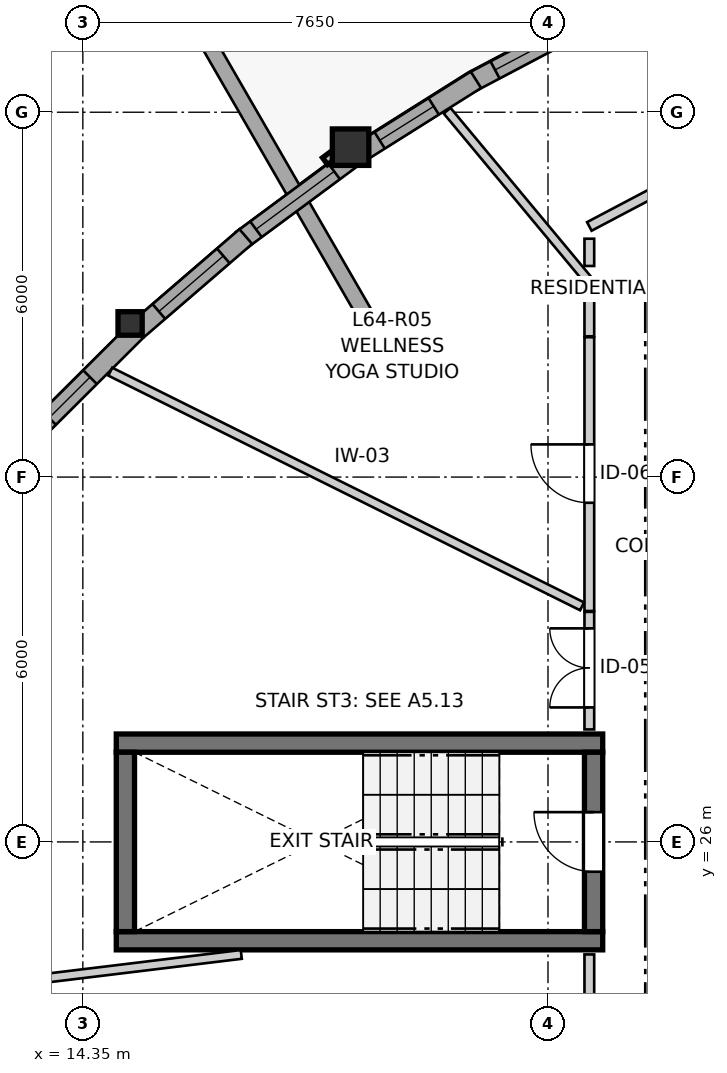
"""IFC4 building model, lengths in metres.
Left out: names, types, materials, properties, quantities, classifications, styles, units other than length and angle.
Written with IfcOpenShell. Run it as: python <this file> out.ifc"""

import sys

from ifc_helpers import new_model, si_unit, direction, frame, frame_2d, origin, origin_2d, place, context, subcontext, project, spatial, rectangle, i_section, extrude, source, transform, mapped, element, fill, save


model = new_model("IFC4")
c1 = context("Model", 3, precision=1e-05, world=origin(), true_north=direction((0.0, 1.0)))
c2 = subcontext(c1, "Body", "Model", "MODEL_VIEW")
j1 = project(units=[si_unit("LENGTHUNIT", "METRE"), si_unit("PLANEANGLEUNIT", "RADIAN")], contexts=[c1])
p1 = place(None, origin())
s1 = spatial("IfcSite", under=j1, at=p1, CompositionType="ELEMENT")
p2 = place(p1, origin())
s2 = spatial("IfcBuilding", under=s1, at=p2, CompositionType="ELEMENT")
p3 = place(p2, frame((0.0, 0.0, 214.8)))
s3 = spatial("IfcBuildingStorey", under=s2, at=p3, CompositionType="ELEMENT", Elevation=214.8)
for number, where, z_axis, x_axis in (
    (1, (14.9, 24.375, 0.0), (0.0, 0.0, 1.0), (1.0, 0.0, 0.0)),
    (2, (22.9, 27.625, 0.0), (0.0, 0.0, 1.0), (-1.0, 0.0, 0.0)),
):
    element("IfcWall", number, at=place(p3, frame(where, z_axis=z_axis, x_axis=x_axis)), inside=s3, PredefinedType="SHEAR", context=c2, shape_type="SweptSolid", body=[
        extrude(rectangle(XDim=8.0, YDim=0.3, at=frame_2d((4.0, 0.0))), origin(), (0.0, 0.0, 1.0), 2.96),
    ])
p4 = place(p3, frame((15.05, 27.475, 0.0), z_axis=(0.0, 0.0, 1.0), x_axis=(0.0, -1.0, 0.0)))
e3 = element("IfcWall", 3, at=p4, inside=s3, PredefinedType="SHEAR", context=c2, shape_type="SweptSolid", body=[
    extrude(rectangle(XDim=2.95, YDim=0.3, at=frame_2d((1.475, 0.0))), origin(), (0.0, 0.0, 1.0), 2.96),
])
p5 = place(p3, frame((22.75, 24.525, 0.0), z_axis=(0.0, 0.0, 1.0), x_axis=(0.0, 1.0, 0.0)))
e4 = element("IfcWall", 4, at=p5, inside=s3, PredefinedType="SHEAR", context=c2, shape_type="SweptSolid", body=[
    extrude(rectangle(XDim=2.95, YDim=0.3, at=frame_2d((1.475, 0.0))), origin(), (0.0, 0.0, 1.0), 2.96),
])
p6 = place(p5, frame((0.985, 0.0, 0.0)))
e5 = element("IfcOpeningElement", 5, at=p6, cuts=e4, PredefinedType="OPENING", context=c2, shape_type="SweptSolid", body=[
    extrude(rectangle(XDim=0.98, YDim=2.15, at=frame_2d((0.49, 1.075))), frame((0.0, 0.16, 0.0), z_axis=(0.0, -1.0, 0.0), x_axis=(1.0, 0.0, 0.0)), (0.0, 0.0, 1.0), 0.32),
])
m1 = source(origin(), c2, "Body", "SweptSolid", [
    extrude(rectangle(XDim=0.6, YDim=0.6, at=origin_2d()), origin(), (0.0, 0.0, 1.0), 2.96),
])
p7 = place(p3, frame((18.753, 37.426, 0.0), z_axis=(0.0, 0.0, 1.0), x_axis=(1.0, 0.0, 0.0)))
e6 = element("IfcColumn", 6, at=p7, inside=s3, PredefinedType="COLUMN", context=c2, shape_type="MappedRepresentation", body=[
    mapped(m1, transform((0.0, 0.0, 0.0), x_axis=(1.0, 0.0, 0.0), y_axis=(0.0, 1.0, 0.0), z_axis=(0.0, 0.0, 1.0), scale=1.0)),
])
m2 = source(origin(), c2, "Body", "SweptSolid", [
    extrude(i_section(OverallWidth=0.398, OverallDepth=0.387, WebThickness=0.019, FlangeThickness=0.03, FilletRadius=0.015, at=origin_2d()), origin(), (0.0, 0.0, 1.0), 2.96),
])
p8 = place(p3, frame((15.127, 34.526, 0.0), z_axis=(0.0, 0.0, 1.0), x_axis=(1.0, 0.0, 0.0)))
e7 = element("IfcColumn", 7, at=p8, inside=s3, PredefinedType="PILASTER", context=c2, shape_type="MappedRepresentation", body=[
    mapped(m2, transform((0.0, 0.0, 0.0), x_axis=(1.0, 0.0, 0.0), y_axis=(0.0, 1.0, 0.0), z_axis=(0.0, 0.0, 1.0), scale=1.0)),
])
p9 = place(p3, frame((8.912, 52.131, 0.0), z_axis=(0.0, 0.0, 1.0), x_axis=(0.500001129448, -0.866024751696, 0.0)))
e8 = element("IfcWall", 8, at=p9, inside=s3, PredefinedType="PARAPET", context=c2, shape_type="SweptSolid", body=[
    extrude(rectangle(XDim=20.349, YDim=0.26, at=frame_2d((10.175, 0.0))), origin(), (0.0, 0.0, 1.0), 0.55),
])
p10 = place(p3, frame((22.785, 39.57, 0.0), z_axis=(0.0, 0.0, 1.0), x_axis=(-0.884379914657, -0.466767786541, 0.0)))
e9 = element("IfcWall", 9, at=p10, inside=s3, PredefinedType="SOLIDWALL", context=c2, shape_type="SweptSolid", body=[
    extrude(rectangle(XDim=2.314, YDim=0.32, at=frame_2d((1.157, 0.0))), origin(), (0.0, 0.0, 1.0), 2.58),
])
p11 = place(p10, frame((0.422, 0.0, 0.82)))
e10 = element("IfcOpeningElement", 10, at=p11, cuts=e9, PredefinedType="OPENING", context=c2, shape_type="SweptSolid", body=[
    extrude(rectangle(XDim=1.45, YDim=1.25, at=frame_2d((0.725, 0.625))), frame((0.0, 0.17, 0.0), z_axis=(0.0, -1.0, 0.0), x_axis=(1.0, 0.0, 0.0)), (0.0, 0.0, 1.0), 0.34),
])
p12 = place(p3, frame((20.815, 38.533, 0.0), z_axis=(0.0, 0.0, 1.0), x_axis=(-0.846418054627, -0.532518991963, 0.0)))
e11 = element("IfcWall", 11, at=p12, inside=s3, PredefinedType="SOLIDWALL", context=c2, shape_type="SweptSolid", body=[
    extrude(rectangle(XDim=2.245, YDim=0.32, at=frame_2d((1.122, 0.0))), origin(), (0.0, 0.0, 1.0), 2.58),
])
p13 = place(p12, frame((0.82, 0.0, 0.82)))
e12 = element("IfcOpeningElement", 12, at=p13, cuts=e11, PredefinedType="OPENING", context=c2, shape_type="SweptSolid", body=[
    extrude(rectangle(XDim=1.05, YDim=1.45, at=frame_2d((0.525, 0.725))), frame((0.0, 0.17, 0.0), z_axis=(0.0, -1.0, 0.0), x_axis=(1.0, 0.0, 0.0)), (0.0, 0.0, 1.0), 0.34),
])
p14 = place(p3, frame((18.776, 37.243, 0.0), z_axis=(0.0, 0.0, 1.0), x_axis=(-0.803798468353, -0.594901691267, 0.0)))
e13 = element("IfcWall", 13, at=p14, inside=s3, PredefinedType="SOLIDWALL", context=c2, shape_type="SweptSolid", body=[
    extrude(rectangle(XDim=2.258, YDim=0.32, at=frame_2d((1.129, 0.0))), origin(), (0.0, 0.0, 1.0), 2.58),
])
p15 = place(p14, frame((0.364, 0.0, 0.82)))
e14 = element("IfcOpeningElement", 14, at=p15, cuts=e13, PredefinedType="OPENING", context=c2, shape_type="SweptSolid", body=[
    extrude(rectangle(XDim=1.6, YDim=1.35, at=frame_2d((0.8, 0.675))), frame((0.0, 0.17, 0.0), z_axis=(0.0, -1.0, 0.0), x_axis=(1.0, 0.0, 0.0)), (0.0, 0.0, 1.0), 0.34),
])
p16 = place(p3, frame((17.03, 35.955, 0.0), z_axis=(0.0, 0.0, 1.0), x_axis=(-0.757489541562, -0.652847297937, 0.0)))
e15 = element("IfcWall", 15, at=p16, inside=s3, PredefinedType="SOLIDWALL", context=c2, shape_type="SweptSolid", body=[
    extrude(rectangle(XDim=2.354, YDim=0.32, at=frame_2d((1.177, 0.0))), origin(), (0.0, 0.0, 1.0), 2.58),
])
p17 = place(p16, frame((0.487, 0.0, 0.82)))
e16 = element("IfcOpeningElement", 16, at=p17, cuts=e15, PredefinedType="OPENING", context=c2, shape_type="SweptSolid", body=[
    extrude(rectangle(XDim=1.4, YDim=1.35, at=frame_2d((0.7, 0.675))), frame((0.0, 0.17, 0.0), z_axis=(0.0, -1.0, 0.0), x_axis=(1.0, 0.0, 0.0)), (0.0, 0.0, 1.0), 0.34),
])
p18 = place(p3, frame((15.226, 34.399, 0.0), z_axis=(0.0, 0.0, 1.0), x_axis=(-0.708431997636, -0.705779076429, 0.0)))
e17 = element("IfcWall", 17, at=p18, inside=s3, PredefinedType="SOLIDWALL", context=c2, shape_type="SweptSolid", body=[
    extrude(rectangle(XDim=2.393, YDim=0.32, at=frame_2d((1.196, 0.0))), origin(), (0.0, 0.0, 1.0), 2.58),
])
p19 = place(p18, frame((1.07, 0.0, 0.82)))
e18 = element("IfcOpeningElement", 18, at=p19, cuts=e17, PredefinedType="OPENING", context=c2, shape_type="SweptSolid", body=[
    extrude(rectangle(XDim=0.95, YDim=1.35, at=frame_2d((0.475, 0.675))), frame((0.0, 0.17, 0.0), z_axis=(0.0, -1.0, 0.0), x_axis=(1.0, 0.0, 0.0)), (0.0, 0.0, 1.0), 0.34),
])
p20 = place(p3, frame((22.68, 29.798, 0.0), z_axis=(0.0, 0.0, 1.0), x_axis=(0.0, 1.0, 0.0)))
e19 = element("IfcWall", 19, at=p20, inside=s3, PredefinedType="PARTITIONING", context=c2, shape_type="SweptSolid", body=[
    extrude(rectangle(XDim=4.502, YDim=0.16, at=frame_2d((2.251, 0.0))), origin(), (0.0, 0.0, 1.0), 2.96),
])
p21 = place(p20, frame((1.78, 0.0, 0.0)))
e20 = element("IfcOpeningElement", 20, at=p21, cuts=e19, PredefinedType="OPENING", context=c2, shape_type="SweptSolid", body=[
    extrude(rectangle(XDim=0.96, YDim=2.1, at=frame_2d((0.48, 1.05))), frame((0.0, 0.09, 0.0), z_axis=(0.0, -1.0, 0.0), x_axis=(1.0, 0.0, 0.0)), (0.0, 0.0, 1.0), 0.18),
])
p22 = place(p3, frame((22.68, 21.241, 0.0), z_axis=(0.0, 0.0, 1.0), x_axis=(0.0, 1.0, 0.0)))
e21 = element("IfcWall", 21, at=p22, inside=s3, PredefinedType="PARTITIONING", context=c2, shape_type="SweptSolid", body=[
    extrude(rectangle(XDim=2.909, YDim=0.16, at=frame_2d((1.455, 0.0))), origin(), (0.0, 0.0, 1.0), 2.96),
])
p23 = place(p22, frame((0.826, 0.0, 0.0)))
e22 = element("IfcOpeningElement", 22, at=p23, cuts=e21, PredefinedType="OPENING", context=c2, shape_type="SweptSolid", body=[
    extrude(rectangle(XDim=1.3, YDim=2.1, at=frame_2d((0.65, 1.05))), frame((0.0, 0.09, 0.0), z_axis=(0.0, -1.0, 0.0), x_axis=(1.0, 0.0, 0.0)), (0.0, 0.0, 1.0), 0.18),
])
p24 = place(p3, frame((22.68, 27.85, 0.0), z_axis=(0.0, 0.0, 1.0), x_axis=(0.0, 1.0, 0.0)))
e23 = element("IfcWall", 23, at=p24, inside=s3, PredefinedType="PARTITIONING", context=c2, shape_type="SweptSolid", body=[
    extrude(rectangle(XDim=1.933, YDim=0.16, at=frame_2d((0.966, 0.0))), origin(), (0.0, 0.0, 1.0), 2.96),
])
p25 = place(p24, frame((0.362, 0.0, 0.0)))
e24 = element("IfcOpeningElement", 24, at=p25, cuts=e23, PredefinedType="OPENING", context=c2, shape_type="SweptSolid", body=[
    extrude(rectangle(XDim=1.3, YDim=2.1, at=frame_2d((0.65, 1.05))), frame((0.0, 0.09, 0.0), z_axis=(0.0, -1.0, 0.0), x_axis=(1.0, 0.0, 0.0)), (0.0, 0.0, 1.0), 0.18),
])
p26 = place(p3, frame((14.802, 33.734, 0.0), z_axis=(0.0, 0.0, 1.0), x_axis=(0.895354955696, -0.445353234311, 0.0)))
e25 = element("IfcWall", 25, at=p26, inside=s3, PredefinedType="PARTITIONING", context=c2, shape_type="SweptSolid", body=[
    extrude(rectangle(XDim=8.666, YDim=0.145, at=frame_2d((4.333, 0.0))), origin(), (0.0, 0.0, 1.0), 2.96),
])
p27 = place(p3, frame((10.087, 23.315, 0.0), z_axis=(0.0, 0.0, 1.0), x_axis=(0.992692853732, 0.120668546642, 0.0)))
e26 = element("IfcWall", 26, at=p27, inside=s3, PredefinedType="PARTITIONING", context=c2, shape_type="SweptSolid", body=[
    extrude(rectangle(XDim=6.919, YDim=0.145, at=frame_2d((3.46, 0.0))), origin(), (0.0, 0.0, 1.0), 2.96),
])
p28 = place(p3, frame((20.341, 38.025, 0.0), z_axis=(0.0, 0.0, 1.0), x_axis=(0.639731122463, -0.768598784121, 0.0)))
e27 = element("IfcWall", 27, at=p28, inside=s3, PredefinedType="PARTITIONING", context=c2, shape_type="SweptSolid", body=[
    extrude(rectangle(XDim=3.656, YDim=0.145, at=frame_2d((1.828, 0.0))), origin(), (0.0, 0.0, 1.0), 2.96),
])
p29 = place(p3, frame((22.68, 36.122, 0.0), z_axis=(0.0, 0.0, 1.0), x_axis=(0.884468554818, 0.466599802335, 0.0)))
e28 = element("IfcWall", 28, at=p29, inside=s3, PredefinedType="PARTITIONING", context=c2, shape_type="SweptSolid", body=[
    extrude(rectangle(XDim=1.603, YDim=0.16, at=frame_2d((0.802, 0.0))), origin(), (0.0, 0.0, 1.0), 2.96),
])
p30 = place(p3, frame((22.68, 34.315, 0.0), z_axis=(0.0, 0.0, 1.0), x_axis=(0.0, 1.0, 0.0)))
e29 = element("IfcWall", 29, at=p30, inside=s3, PredefinedType="PARTITIONING", context=c2, shape_type="SweptSolid", body=[
    extrude(rectangle(XDim=0.707, YDim=0.16, at=frame_2d((0.353, 0.0))), origin(), (0.0, 0.0, 1.0), 2.96),
])
p31 = place(p3, frame((22.68, 35.471, 0.0), z_axis=(0.0, 0.0, 1.0), x_axis=(0.0, 1.0, 0.0)))
e30 = element("IfcWall", 30, at=p31, inside=s3, PredefinedType="PARTITIONING", context=c2, shape_type="SweptSolid", body=[
    extrude(rectangle(XDim=0.448, YDim=0.16, at=frame_2d((0.224, 0.0))), origin(), (0.0, 0.0, 1.0), 2.96),
])
m3 = source(origin(), c2, "Body", "SweptSolid", [
    extrude(rectangle(XDim=1.45, YDim=1.25, at=frame_2d((0.725, 0.625))), frame((0.0, 0.03, 0.0), z_axis=(0.0, -1.0, 0.0), x_axis=(1.0, 0.0, 0.0)), (0.0, 0.0, 1.0), 0.06),
])
p32 = place(p11, origin())
e31 = element("IfcWindow", 31, at=p32, inside=s3, PartitioningType="SINGLE_PANEL", PredefinedType="WINDOW", context=c2, shape_type="MappedRepresentation", body=[
    mapped(m3, transform((0.0, 0.0, 0.0), x_axis=(1.0, 0.0, 0.0), y_axis=(0.0, 1.0, 0.0), z_axis=(0.0, 0.0, 1.0), scale=1.0)),
])
fill(e10, e31)
m4 = source(origin(), c2, "Body", "SweptSolid", [
    extrude(rectangle(XDim=1.05, YDim=1.45, at=frame_2d((0.525, 0.725))), frame((0.0, 0.03, 0.0), z_axis=(0.0, -1.0, 0.0), x_axis=(1.0, 0.0, 0.0)), (0.0, 0.0, 1.0), 0.06),
])
p33 = place(p13, origin())
e32 = element("IfcWindow", 32, at=p33, inside=s3, PartitioningType="SINGLE_PANEL", PredefinedType="WINDOW", context=c2, shape_type="MappedRepresentation", body=[
    mapped(m4, transform((0.0, 0.0, 0.0), x_axis=(1.0, 0.0, 0.0), y_axis=(0.0, 1.0, 0.0), z_axis=(0.0, 0.0, 1.0), scale=1.0)),
])
fill(e12, e32)
m5 = source(origin(), c2, "Body", "SweptSolid", [
    extrude(rectangle(XDim=1.6, YDim=1.35, at=frame_2d((0.8, 0.675))), frame((0.0, 0.03, 0.0), z_axis=(0.0, -1.0, 0.0), x_axis=(1.0, 0.0, 0.0)), (0.0, 0.0, 1.0), 0.06),
])
p34 = place(p15, origin())
e33 = element("IfcWindow", 33, at=p34, inside=s3, PartitioningType="SINGLE_PANEL", PredefinedType="WINDOW", context=c2, shape_type="MappedRepresentation", body=[
    mapped(m5, transform((0.0, 0.0, 0.0), x_axis=(1.0, 0.0, 0.0), y_axis=(0.0, 1.0, 0.0), z_axis=(0.0, 0.0, 1.0), scale=1.0)),
])
fill(e14, e33)
m6 = source(origin(), c2, "Body", "SweptSolid", [
    extrude(rectangle(XDim=1.4, YDim=1.35, at=frame_2d((0.7, 0.675))), frame((0.0, 0.03, 0.0), z_axis=(0.0, -1.0, 0.0), x_axis=(1.0, 0.0, 0.0)), (0.0, 0.0, 1.0), 0.06),
])
p35 = place(p17, origin())
e34 = element("IfcWindow", 34, at=p35, inside=s3, PartitioningType="SINGLE_PANEL", PredefinedType="WINDOW", context=c2, shape_type="MappedRepresentation", body=[
    mapped(m6, transform((0.0, 0.0, 0.0), x_axis=(1.0, 0.0, 0.0), y_axis=(0.0, 1.0, 0.0), z_axis=(0.0, 0.0, 1.0), scale=1.0)),
])
fill(e16, e34)
m7 = source(origin(), c2, "Body", "SweptSolid", [
    extrude(rectangle(XDim=0.95, YDim=1.35, at=frame_2d((0.475, 0.675))), frame((0.0, 0.03, 0.0), z_axis=(0.0, -1.0, 0.0), x_axis=(1.0, 0.0, 0.0)), (0.0, 0.0, 1.0), 0.06),
])
p36 = place(p19, origin())
e35 = element("IfcWindow", 35, at=p36, inside=s3, PartitioningType="SINGLE_PANEL", PredefinedType="WINDOW", context=c2, shape_type="MappedRepresentation", body=[
    mapped(m7, transform((0.0, 0.0, 0.0), x_axis=(1.0, 0.0, 0.0), y_axis=(0.0, 1.0, 0.0), z_axis=(0.0, 0.0, 1.0), scale=1.0)),
])
fill(e18, e35)
m8 = source(origin(), c2, "Body", "SweptSolid", [
    extrude(rectangle(XDim=0.98, YDim=2.15, at=frame_2d((0.49, 1.075))), frame((0.0, 0.025, 0.0), z_axis=(0.0, -1.0, 0.0), x_axis=(1.0, 0.0, 0.0)), (0.0, 0.0, 1.0), 0.05),
])
p37 = place(p6, origin())
e36 = element("IfcDoor", 36, at=p37, inside=s3, OperationType="SINGLE_SWING_RIGHT", PredefinedType="DOOR", context=c2, shape_type="MappedRepresentation", body=[
    mapped(m8, transform((0.0, 0.0, 0.0), x_axis=(1.0, 0.0, 0.0), y_axis=(0.0, 1.0, 0.0), z_axis=(0.0, 0.0, 1.0), scale=1.0)),
])
fill(e5, e36)
m9 = source(origin(), c2, "Body", "SweptSolid", [
    extrude(rectangle(XDim=0.96, YDim=2.1, at=frame_2d((0.48, 1.05))), frame((0.0, 0.025, 0.0), z_axis=(0.0, -1.0, 0.0), x_axis=(1.0, 0.0, 0.0)), (0.0, 0.0, 1.0), 0.05),
])
p38 = place(p21, origin())
e37 = element("IfcDoor", 37, at=p38, inside=s3, OperationType="SINGLE_SWING_RIGHT", PredefinedType="DOOR", context=c2, shape_type="MappedRepresentation", body=[
    mapped(m9, transform((0.0, 0.0, 0.0), x_axis=(1.0, 0.0, 0.0), y_axis=(0.0, 1.0, 0.0), z_axis=(0.0, 0.0, 1.0), scale=1.0)),
])
fill(e20, e37)
m10 = source(origin(), c2, "Body", "SweptSolid", [
    extrude(rectangle(XDim=1.3, YDim=2.1, at=frame_2d((0.65, 1.05))), frame((0.0, 0.025, 0.0), z_axis=(0.0, -1.0, 0.0), x_axis=(1.0, 0.0, 0.0)), (0.0, 0.0, 1.0), 0.05),
])
p39 = place(p25, origin())
e38 = element("IfcDoor", 38, at=p39, inside=s3, OperationType="DOUBLE_DOOR_SINGLE_SWING", PredefinedType="DOOR", context=c2, shape_type="MappedRepresentation", body=[
    mapped(m10, transform((0.0, 0.0, 0.0), x_axis=(1.0, 0.0, 0.0), y_axis=(0.0, 1.0, 0.0), z_axis=(0.0, 0.0, 1.0), scale=1.0)),
])
fill(e24, e38)
save(model, sys.argv[1])
